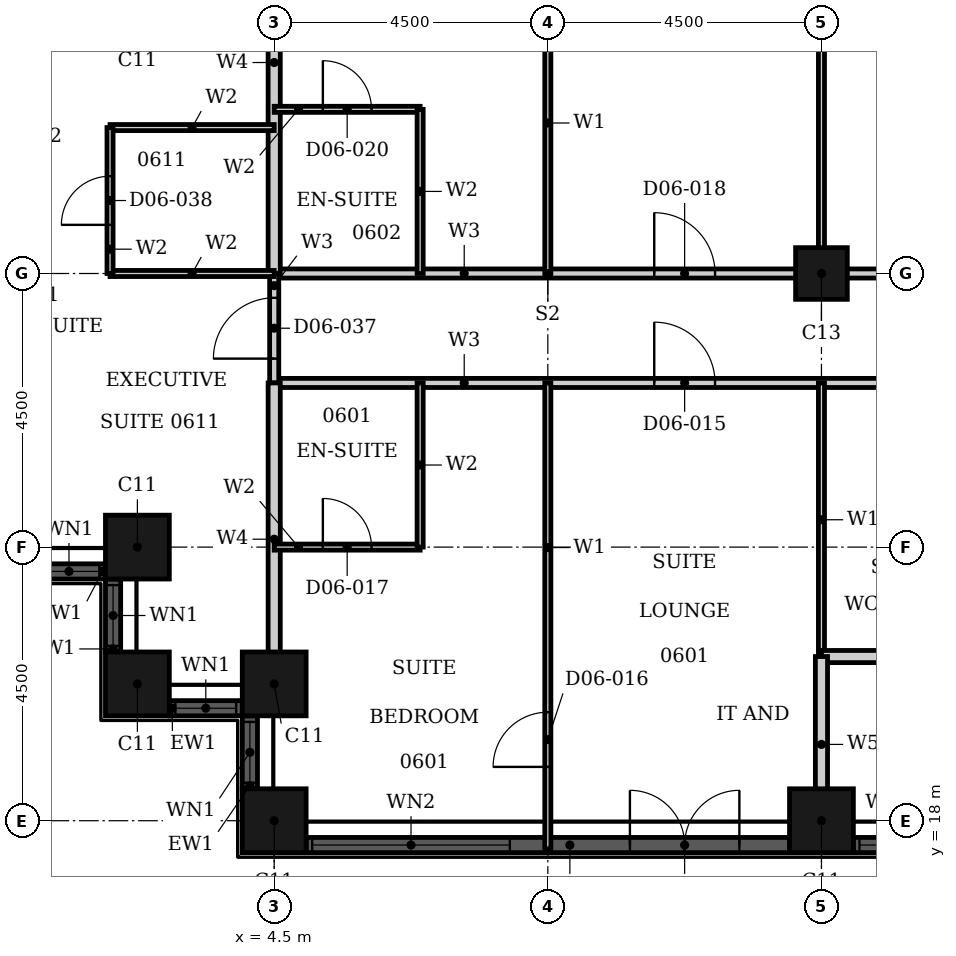
"""IFC4 building model, lengths in metres.
Left out: names, types, materials, properties, quantities, classifications, styles, units other than length and angle.
Written with IfcOpenShell. Run it as: python <this file> out.ifc"""

import sys

from ifc_helpers import new_model, si_unit, direction, frame, frame_2d, origin, origin_2d, place, context, subcontext, project, spatial, rectangle, hollow_rectangle, extrude, element, fill, save


model = new_model("IFC4")
c1 = context("Model", 3, precision=1e-05, world=origin(), true_north=direction((0.0, 1.0)))
c2 = subcontext(c1, "Body", "Model", "MODEL_VIEW")
j1 = project(units=[si_unit("LENGTHUNIT", "METRE"), si_unit("PLANEANGLEUNIT", "RADIAN")], contexts=[c1])
p1 = place(None, origin())
s1 = spatial("IfcSite", under=j1, at=p1, CompositionType="ELEMENT")
p2 = place(p1, origin())
s2 = spatial("IfcBuilding", under=s1, at=p2, CompositionType="ELEMENT")
p3 = place(p2, frame((0.0, 0.0, 33.6)))
s3 = spatial("IfcBuildingStorey", under=s2, at=p3, CompositionType="ELEMENT", Elevation=33.6)
for number, where, z_axis, x_axis in (
    (1, (2.25, 22.5, 0.0), (0.0, 0.0, 1.0), (1.0, 0.0, 0.0)),
    (2, (2.25, 20.25, 0.0), (0.0, 0.0, 1.0), (1.0, 0.0, 0.0)),
    (3, (4.5, 20.25, 0.0), (0.0, 0.0, 1.0), (1.0, 0.0, 0.0)),
    (4, (4.5, 18.0, 0.0), (0.0, 0.0, 1.0), (1.0, 0.0, 0.0)),
    (5, (13.5, 18.0, 0.0), (0.0, 0.0, 1.0), (1.0, 0.0, 0.0)),
):
    element("IfcColumn", number, at=place(p3, frame(where, z_axis=z_axis, x_axis=x_axis)), inside=s3, PredefinedType="COLUMN", context=c2, shape_type="SweptSolid", body=[
        extrude(hollow_rectangle(XDim=1.05, YDim=1.05, WallThickness=0.034, at=origin_2d()), origin(), (0.0, 0.0, 1.0), 3.6),
    ])
p4 = place(p3, frame((13.5, 27.0, 0.0), z_axis=(0.0, 0.0, 1.0), x_axis=(1.0, 0.0, 0.0)))
e6 = element("IfcColumn", 6, at=p4, inside=s3, PredefinedType="COLUMN", context=c2, shape_type="SweptSolid", body=[
    extrude(hollow_rectangle(XDim=0.85, YDim=0.85, WallThickness=0.026, at=origin_2d()), origin(), (0.0, 0.0, 1.0), 3.6),
])
p5 = place(p3, frame((0.525, 22.1, 0.0), z_axis=(0.0, 0.0, 1.0), x_axis=(1.0, 0.0, 0.0)))
e7 = element("IfcWall", 7, at=p5, inside=s3, PredefinedType="SOLIDWALL", context=c2, shape_type="SweptSolid", body=[
    extrude(rectangle(XDim=1.2, YDim=0.25, at=frame_2d((0.6, 0.0))), origin(), (0.0, 0.0, 1.0), 3.6),
])
p6 = place(p5, frame((0.1, 0.0, 0.9)))
e8 = element("IfcOpeningElement", 8, at=p6, cuts=e7, PredefinedType="OPENING", context=c2, shape_type="SweptSolid", body=[
    extrude(rectangle(XDim=1.0, YDim=2.08, at=frame_2d((0.5, 1.04))), frame((0.0, 0.135, 0.0), z_axis=(0.0, -1.0, 0.0), x_axis=(1.0, 0.0, 0.0)), (0.0, 0.0, 1.0), 0.27),
])
p7 = place(p3, frame((1.85, 21.975, 0.0), z_axis=(0.0, 0.0, 1.0), x_axis=(0.0, -1.0, 0.0)))
e9 = element("IfcWall", 9, at=p7, inside=s3, PredefinedType="SOLIDWALL", context=c2, shape_type="SweptSolid", body=[
    extrude(rectangle(XDim=1.2, YDim=0.25, at=frame_2d((0.6, 0.0))), origin(), (0.0, 0.0, 1.0), 3.6),
])
p8 = place(p7, frame((0.1, 0.0, 0.9)))
e10 = element("IfcOpeningElement", 10, at=p8, cuts=e9, PredefinedType="OPENING", context=c2, shape_type="SweptSolid", body=[
    extrude(rectangle(XDim=1.0, YDim=2.08, at=frame_2d((0.5, 1.04))), frame((0.0, 0.135, 0.0), z_axis=(0.0, -1.0, 0.0), x_axis=(1.0, 0.0, 0.0)), (0.0, 0.0, 1.0), 0.27),
])
p9 = place(p3, frame((2.775, 19.85, 0.0), z_axis=(0.0, 0.0, 1.0), x_axis=(1.0, 0.0, 0.0)))
e11 = element("IfcWall", 11, at=p9, inside=s3, PredefinedType="SOLIDWALL", context=c2, shape_type="SweptSolid", body=[
    extrude(rectangle(XDim=1.2, YDim=0.25, at=frame_2d((0.6, 0.0))), origin(), (0.0, 0.0, 1.0), 3.6),
])
p10 = place(p9, frame((0.1, 0.0, 0.9)))
e12 = element("IfcOpeningElement", 12, at=p10, cuts=e11, PredefinedType="OPENING", context=c2, shape_type="SweptSolid", body=[
    extrude(rectangle(XDim=1.0, YDim=2.08, at=frame_2d((0.5, 1.04))), frame((0.0, 0.135, 0.0), z_axis=(0.0, -1.0, 0.0), x_axis=(1.0, 0.0, 0.0)), (0.0, 0.0, 1.0), 0.27),
])
p11 = place(p3, frame((4.1, 19.725, 0.0), z_axis=(0.0, 0.0, 1.0), x_axis=(0.0, -1.0, 0.0)))
e13 = element("IfcWall", 13, at=p11, inside=s3, PredefinedType="SOLIDWALL", context=c2, shape_type="SweptSolid", body=[
    extrude(rectangle(XDim=1.2, YDim=0.25, at=frame_2d((0.6, 0.0))), origin(), (0.0, 0.0, 1.0), 3.6),
])
p12 = place(p11, frame((0.1, 0.0, 0.9)))
e14 = element("IfcOpeningElement", 14, at=p12, cuts=e13, PredefinedType="OPENING", context=c2, shape_type="SweptSolid", body=[
    extrude(rectangle(XDim=1.0, YDim=2.08, at=frame_2d((0.5, 1.04))), frame((0.0, 0.135, 0.0), z_axis=(0.0, -1.0, 0.0), x_axis=(1.0, 0.0, 0.0)), (0.0, 0.0, 1.0), 0.27),
])
p13 = place(p3, frame((5.025, 17.6, 0.0), z_axis=(0.0, 0.0, 1.0), x_axis=(1.0, 0.0, 0.0)))
e15 = element("IfcWall", 15, at=p13, inside=s3, PredefinedType="SOLIDWALL", context=c2, shape_type="SweptSolid", body=[
    extrude(rectangle(XDim=7.95, YDim=0.25, at=frame_2d((3.975, 0.0))), origin(), (0.0, 0.0, 1.0), 3.6),
])
p14 = place(p13, frame((0.1, 0.0, 0.9)))
e16 = element("IfcOpeningElement", 16, at=p14, cuts=e15, PredefinedType="OPENING", context=c2, shape_type="SweptSolid", body=[
    extrude(rectangle(XDim=3.25, YDim=2.08, at=frame_2d((1.625, 1.04))), frame((0.0, 0.135, 0.0), z_axis=(0.0, -1.0, 0.0), x_axis=(1.0, 0.0, 0.0)), (0.0, 0.0, 1.0), 0.27),
])
p15 = place(p13, frame((5.325, 0.0, 0.0)))
e17 = element("IfcOpeningElement", 17, at=p15, cuts=e15, PredefinedType="OPENING", context=c2, shape_type="SweptSolid", body=[
    extrude(rectangle(XDim=1.8, YDim=2.4, at=frame_2d((0.9, 1.2))), frame((0.0, 0.135, 0.0), z_axis=(0.0, -1.0, 0.0), x_axis=(1.0, 0.0, 0.0)), (0.0, 0.0, 1.0), 0.27),
])
p16 = place(p3, frame((14.025, 17.6, 0.0), z_axis=(0.0, 0.0, 1.0), x_axis=(1.0, 0.0, 0.0)))
e18 = element("IfcWall", 18, at=p16, inside=s3, PredefinedType="SOLIDWALL", context=c2, shape_type="SweptSolid", body=[
    extrude(rectangle(XDim=1.2, YDim=0.25, at=frame_2d((0.6, 0.0))), origin(), (0.0, 0.0, 1.0), 3.6),
])
p17 = place(p16, frame((0.1, 0.0, 0.9)))
e19 = element("IfcOpeningElement", 19, at=p17, cuts=e18, PredefinedType="OPENING", context=c2, shape_type="SweptSolid", body=[
    extrude(rectangle(XDim=1.0, YDim=2.08, at=frame_2d((0.5, 1.04))), frame((0.0, 0.135, 0.0), z_axis=(0.0, -1.0, 0.0), x_axis=(1.0, 0.0, 0.0)), (0.0, 0.0, 1.0), 0.27),
])
p18 = place(p3, frame((4.5, 25.2, 0.0), z_axis=(0.0, 0.0, 1.0), x_axis=(1.0, 0.0, 0.0)))
e20 = element("IfcWall", 20, at=p18, inside=s3, PredefinedType="PARTITIONING", context=c2, shape_type="SweptSolid", body=[
    extrude(rectangle(XDim=11.7, YDim=0.15, at=frame_2d((5.85, 0.0))), origin(), (0.0, 0.0, 1.0), 3.3),
])
p19 = place(p18, frame((6.25, 0.0, 0.0)))
e21 = element("IfcOpeningElement", 21, at=p19, cuts=e20, PredefinedType="OPENING", context=c2, shape_type="SweptSolid", body=[
    extrude(rectangle(XDim=1.0, YDim=2.1, at=frame_2d((0.5, 1.05))), frame((0.0, 0.085, 0.0), z_axis=(0.0, -1.0, 0.0), x_axis=(1.0, 0.0, 0.0)), (0.0, 0.0, 1.0), 0.17),
])
p20 = place(p3, frame((4.5, 27.0, 0.0), z_axis=(0.0, 0.0, 1.0), x_axis=(1.0, 0.0, 0.0)))
e22 = element("IfcWall", 22, at=p20, inside=s3, PredefinedType="PARTITIONING", context=c2, shape_type="SweptSolid", body=[
    extrude(rectangle(XDim=11.7, YDim=0.15, at=frame_2d((5.85, 0.0))), origin(), (0.0, 0.0, 1.0), 2.58),
])
p21 = place(p20, frame((6.25, 0.0, 0.0)))
e23 = element("IfcOpeningElement", 23, at=p21, cuts=e22, PredefinedType="OPENING", context=c2, shape_type="SweptSolid", body=[
    extrude(rectangle(XDim=1.0, YDim=2.1, at=frame_2d((0.5, 1.05))), frame((0.0, 0.085, 0.0), z_axis=(0.0, -1.0, 0.0), x_axis=(1.0, 0.0, 0.0)), (0.0, 0.0, 1.0), 0.17),
])
p22 = place(p3, frame((4.5, 25.2, 0.0), z_axis=(0.0, 0.0, 1.0), x_axis=(0.0, 1.0, 0.0)))
e24 = element("IfcWall", 24, at=p22, inside=s3, PredefinedType="PARTITIONING", context=c2, shape_type="SweptSolid", body=[
    extrude(rectangle(XDim=1.8, YDim=0.15, at=frame_2d((0.9, 0.0))), origin(), (0.0, 0.0, 1.0), 3.3),
])
p23 = place(p22, frame((0.4, 0.0, 0.0)))
e25 = element("IfcOpeningElement", 25, at=p23, cuts=e24, PredefinedType="OPENING", context=c2, shape_type="SweptSolid", body=[
    extrude(rectangle(XDim=1.0, YDim=2.1, at=frame_2d((0.5, 1.05))), frame((0.0, 0.085, 0.0), z_axis=(0.0, -1.0, 0.0), x_axis=(1.0, 0.0, 0.0)), (0.0, 0.0, 1.0), 0.17),
])
p24 = place(p3, frame((13.5, 27.0, 0.0), z_axis=(0.0, 0.0, 1.0), x_axis=(0.0, 1.0, 0.0)))
e26 = element("IfcWall", 26, at=p24, inside=s3, PredefinedType="PARTITIONING", context=c2, shape_type="SweptSolid", body=[
    extrude(rectangle(XDim=9.19, YDim=0.1, at=frame_2d((4.595, 0.0))), origin(), (0.0, 0.0, 1.0), 2.38),
])
p25 = place(p3, frame((13.5, 20.7, 0.0), z_axis=(0.0, 0.0, 1.0), x_axis=(0.0, 1.0, 0.0)))
e27 = element("IfcWall", 27, at=p25, inside=s3, PredefinedType="PARTITIONING", context=c2, shape_type="SweptSolid", body=[
    extrude(rectangle(XDim=4.5, YDim=0.1, at=frame_2d((2.25, 0.0))), origin(), (0.0, 0.0, 1.0), 2.38),
])
p26 = place(p3, frame((9.0, 27.0, 0.0), z_axis=(0.0, 0.0, 1.0), x_axis=(0.0, 1.0, 0.0)))
e28 = element("IfcWall", 28, at=p26, inside=s3, PredefinedType="PARTITIONING", context=c2, shape_type="SweptSolid", body=[
    extrude(rectangle(XDim=9.465, YDim=0.1, at=frame_2d((4.732, 0.0))), origin(), (0.0, 0.0, 1.0), 3.3),
])
p27 = place(p26, frame((4.95, 0.0, 0.0)))
e29 = element("IfcOpeningElement", 29, at=p27, cuts=e28, PredefinedType="OPENING", context=c2, shape_type="SweptSolid", body=[
    extrude(rectangle(XDim=0.9, YDim=2.1, at=frame_2d((0.45, 1.05))), frame((0.0, 0.06, 0.0), z_axis=(0.0, -1.0, 0.0), x_axis=(1.0, 0.0, 0.0)), (0.0, 0.0, 1.0), 0.12),
])
p28 = place(p3, frame((9.0, 17.535, 0.0), z_axis=(0.0, 0.0, 1.0), x_axis=(0.0, 1.0, 0.0)))
e30 = element("IfcWall", 30, at=p28, inside=s3, PredefinedType="PARTITIONING", context=c2, shape_type="SweptSolid", body=[
    extrude(rectangle(XDim=7.665, YDim=0.1, at=frame_2d((3.833, 0.0))), origin(), (0.0, 0.0, 1.0), 3.3),
])
p29 = place(p28, frame((1.35, 0.0, 0.0)))
e31 = element("IfcOpeningElement", 31, at=p29, cuts=e30, PredefinedType="OPENING", context=c2, shape_type="SweptSolid", body=[
    extrude(rectangle(XDim=0.9, YDim=2.1, at=frame_2d((0.45, 1.05))), frame((0.0, 0.06, 0.0), z_axis=(0.0, -1.0, 0.0), x_axis=(1.0, 0.0, 0.0)), (0.0, 0.0, 1.0), 0.12),
])
p30 = place(p3, frame((4.5, 27.0, 0.0), z_axis=(0.0, 0.0, 1.0), x_axis=(0.0, 1.0, 0.0)))
e32 = element("IfcWall", 32, at=p30, inside=s3, PredefinedType="PARTITIONING", context=c2, shape_type="SweptSolid", body=[
    extrude(rectangle(XDim=6.94, YDim=0.2, at=frame_2d((3.47, 0.0))), origin(), (0.0, 0.0, 1.0), 3.3),
])
p31 = place(p3, frame((4.5, 20.06, 0.0), z_axis=(0.0, 0.0, 1.0), x_axis=(0.0, 1.0, 0.0)))
e33 = element("IfcWall", 33, at=p31, inside=s3, PredefinedType="PARTITIONING", context=c2, shape_type="SweptSolid", body=[
    extrude(rectangle(XDim=5.14, YDim=0.2, at=frame_2d((2.57, 0.0))), origin(), (0.0, 0.0, 1.0), 3.3),
])
p32 = place(p3, frame((4.5, 22.5, 0.0), z_axis=(0.0, 0.0, 1.0), x_axis=(1.0, 0.0, 0.0)))
e34 = element("IfcWall", 34, at=p32, inside=s3, PredefinedType="PARTITIONING", context=c2, shape_type="SweptSolid", body=[
    extrude(rectangle(XDim=2.4, YDim=0.1, at=frame_2d((1.2, 0.0))), origin(), (0.0, 0.0, 1.0), 2.58),
])
p33 = place(p32, frame((0.8, 0.0, 0.0)))
e35 = element("IfcOpeningElement", 35, at=p33, cuts=e34, PredefinedType="OPENING", context=c2, shape_type="SweptSolid", body=[
    extrude(rectangle(XDim=0.8, YDim=2.1, at=frame_2d((0.4, 1.05))), frame((0.0, 0.06, 0.0), z_axis=(0.0, -1.0, 0.0), x_axis=(1.0, 0.0, 0.0)), (0.0, 0.0, 1.0), 0.12),
])
p34 = place(p3, frame((1.8, 27.0, 0.0), z_axis=(0.0, 0.0, 1.0), x_axis=(1.0, 0.0, 0.0)))
e36 = element("IfcWall", 36, at=p34, inside=s3, PredefinedType="PARTITIONING", context=c2, shape_type="SweptSolid", body=[
    extrude(rectangle(XDim=2.7, YDim=0.1, at=frame_2d((1.35, 0.0))), origin(), (0.0, 0.0, 1.0), 2.58),
])
p35 = place(p3, frame((1.8, 29.4, 0.0), z_axis=(0.0, 0.0, 1.0), x_axis=(1.0, 0.0, 0.0)))
e37 = element("IfcWall", 37, at=p35, inside=s3, PredefinedType="PARTITIONING", context=c2, shape_type="SweptSolid", body=[
    extrude(rectangle(XDim=2.7, YDim=0.1, at=frame_2d((1.35, 0.0))), origin(), (0.0, 0.0, 1.0), 3.3),
])
p36 = place(p3, frame((4.5, 29.7, 0.0), z_axis=(0.0, 0.0, 1.0), x_axis=(1.0, 0.0, 0.0)))
e38 = element("IfcWall", 38, at=p36, inside=s3, PredefinedType="PARTITIONING", context=c2, shape_type="SweptSolid", body=[
    extrude(rectangle(XDim=2.4, YDim=0.1, at=frame_2d((1.2, 0.0))), origin(), (0.0, 0.0, 1.0), 3.3),
])
p37 = place(p36, frame((0.8, 0.0, 0.0)))
e39 = element("IfcOpeningElement", 39, at=p37, cuts=e38, PredefinedType="OPENING", context=c2, shape_type="SweptSolid", body=[
    extrude(rectangle(XDim=0.8, YDim=2.1, at=frame_2d((0.4, 1.05))), frame((0.0, 0.06, 0.0), z_axis=(0.0, -1.0, 0.0), x_axis=(1.0, 0.0, 0.0)), (0.0, 0.0, 1.0), 0.12),
])
p38 = place(p3, frame((1.8, 27.0, 0.0), z_axis=(0.0, 0.0, 1.0), x_axis=(0.0, 1.0, 0.0)))
e40 = element("IfcWall", 40, at=p38, inside=s3, PredefinedType="PARTITIONING", context=c2, shape_type="SweptSolid", body=[
    extrude(rectangle(XDim=2.4, YDim=0.1, at=frame_2d((1.2, 0.0))), origin(), (0.0, 0.0, 1.0), 3.3),
])
p39 = place(p38, frame((0.8, 0.0, 0.0)))
e41 = element("IfcOpeningElement", 41, at=p39, cuts=e40, PredefinedType="OPENING", context=c2, shape_type="SweptSolid", body=[
    extrude(rectangle(XDim=0.8, YDim=2.1, at=frame_2d((0.4, 1.05))), frame((0.0, 0.06, 0.0), z_axis=(0.0, -1.0, 0.0), x_axis=(1.0, 0.0, 0.0)), (0.0, 0.0, 1.0), 0.12),
])
for number, where, z_axis, x_axis in (
    (42, (6.9, 27.0, 0.0), (0.0, 0.0, 1.0), (0.0, 1.0, 0.0)),
    (43, (6.9, 22.5, 0.0), (0.0, 0.0, 1.0), (0.0, 1.0, 0.0)),
):
    element("IfcWall", number, at=place(p3, frame(where, z_axis=z_axis, x_axis=x_axis)), inside=s3, PredefinedType="PARTITIONING", context=c2, shape_type="SweptSolid", body=[
        extrude(rectangle(XDim=2.7, YDim=0.1, at=frame_2d((1.35, 0.0))), origin(), (0.0, 0.0, 1.0), 3.3),
    ])
p40 = place(p3, frame((13.5, 20.7, 0.0), z_axis=(0.0, 0.0, 1.0), x_axis=(1.0, 0.0, 0.0)))
e44 = element("IfcWall", 44, at=p40, inside=s3, PredefinedType="PARTITIONING", context=c2, shape_type="SweptSolid", body=[
    extrude(rectangle(XDim=4.5, YDim=0.2, at=frame_2d((2.25, 0.0))), origin(), (0.0, 0.0, 1.0), 3.3),
])
p41 = place(p40, frame((3.15, 0.0, 0.0)))
e45 = element("IfcOpeningElement", 45, at=p41, cuts=e44, PredefinedType="OPENING", context=c2, shape_type="SweptSolid", body=[
    extrude(rectangle(XDim=0.9, YDim=2.1, at=frame_2d((0.45, 1.05))), frame((0.0, 0.11, 0.0), z_axis=(0.0, -1.0, 0.0), x_axis=(1.0, 0.0, 0.0)), (0.0, 0.0, 1.0), 0.22),
])
p42 = place(p3, frame((13.5, 17.81, 0.0), z_axis=(0.0, 0.0, 1.0), x_axis=(0.0, 1.0, 0.0)))
e46 = element("IfcWall", 46, at=p42, inside=s3, PredefinedType="PARTITIONING", context=c2, shape_type="SweptSolid", body=[
    extrude(rectangle(XDim=2.89, YDim=0.2, at=frame_2d((1.445, 0.0))), origin(), (0.0, 0.0, 1.0), 2.38),
])
p43 = place(p6, origin())
e47 = element("IfcWindow", 47, at=p43, inside=s3, PartitioningType="SINGLE_PANEL", PredefinedType="WINDOW", context=c2, shape_type="SweptSolid", body=[
    extrude(rectangle(XDim=1.0, YDim=2.08, at=frame_2d((0.5, 1.04))), frame((0.0, 0.03, 0.0), z_axis=(0.0, -1.0, 0.0), x_axis=(1.0, 0.0, 0.0)), (0.0, 0.0, 1.0), 0.06),
])
fill(e8, e47)
p44 = place(p8, origin())
e48 = element("IfcWindow", 48, at=p44, inside=s3, PartitioningType="SINGLE_PANEL", PredefinedType="WINDOW", context=c2, shape_type="SweptSolid", body=[
    extrude(rectangle(XDim=1.0, YDim=2.08, at=frame_2d((0.5, 1.04))), frame((0.0, 0.03, 0.0), z_axis=(0.0, -1.0, 0.0), x_axis=(1.0, 0.0, 0.0)), (0.0, 0.0, 1.0), 0.06),
])
fill(e10, e48)
p45 = place(p10, origin())
e49 = element("IfcWindow", 49, at=p45, inside=s3, PartitioningType="SINGLE_PANEL", PredefinedType="WINDOW", context=c2, shape_type="SweptSolid", body=[
    extrude(rectangle(XDim=1.0, YDim=2.08, at=frame_2d((0.5, 1.04))), frame((0.0, 0.03, 0.0), z_axis=(0.0, -1.0, 0.0), x_axis=(1.0, 0.0, 0.0)), (0.0, 0.0, 1.0), 0.06),
])
fill(e12, e49)
p46 = place(p12, origin())
e50 = element("IfcWindow", 50, at=p46, inside=s3, PartitioningType="SINGLE_PANEL", PredefinedType="WINDOW", context=c2, shape_type="SweptSolid", body=[
    extrude(rectangle(XDim=1.0, YDim=2.08, at=frame_2d((0.5, 1.04))), frame((0.0, 0.03, 0.0), z_axis=(0.0, -1.0, 0.0), x_axis=(1.0, 0.0, 0.0)), (0.0, 0.0, 1.0), 0.06),
])
fill(e14, e50)
p47 = place(p14, origin())
e51 = element("IfcWindow", 51, at=p47, inside=s3, PartitioningType="SINGLE_PANEL", PredefinedType="WINDOW", context=c2, shape_type="SweptSolid", body=[
    extrude(rectangle(XDim=3.25, YDim=2.08, at=frame_2d((1.625, 1.04))), frame((0.0, 0.03, 0.0), z_axis=(0.0, -1.0, 0.0), x_axis=(1.0, 0.0, 0.0)), (0.0, 0.0, 1.0), 0.06),
])
fill(e16, e51)
p48 = place(p15, origin())
e52 = element("IfcDoor", 52, at=p48, inside=s3, OperationType="DOUBLE_DOOR_SINGLE_SWING", PredefinedType="DOOR", context=c2, shape_type="SweptSolid", body=[
    extrude(rectangle(XDim=1.8, YDim=2.4, at=frame_2d((0.9, 1.2))), frame((0.0, 0.025, 0.0), z_axis=(0.0, -1.0, 0.0), x_axis=(1.0, 0.0, 0.0)), (0.0, 0.0, 1.0), 0.05),
])
fill(e17, e52)
p49 = place(p17, origin())
e53 = element("IfcWindow", 53, at=p49, inside=s3, PartitioningType="SINGLE_PANEL", PredefinedType="WINDOW", context=c2, shape_type="SweptSolid", body=[
    extrude(rectangle(XDim=1.0, YDim=2.08, at=frame_2d((0.5, 1.04))), frame((0.0, 0.03, 0.0), z_axis=(0.0, -1.0, 0.0), x_axis=(1.0, 0.0, 0.0)), (0.0, 0.0, 1.0), 0.06),
])
fill(e19, e53)
p50 = place(p19, origin())
e54 = element("IfcDoor", 54, at=p50, inside=s3, OperationType="SINGLE_SWING_RIGHT", PredefinedType="DOOR", context=c2, shape_type="SweptSolid", body=[
    extrude(rectangle(XDim=1.0, YDim=2.1, at=frame_2d((0.5, 1.05))), frame((0.0, 0.025, 0.0), z_axis=(0.0, -1.0, 0.0), x_axis=(1.0, 0.0, 0.0)), (0.0, 0.0, 1.0), 0.05),
])
fill(e21, e54)
p51 = place(p29, origin())
e55 = element("IfcDoor", 55, at=p51, inside=s3, OperationType="SINGLE_SWING_LEFT", PredefinedType="DOOR", context=c2, shape_type="SweptSolid", body=[
    extrude(rectangle(XDim=0.9, YDim=2.1, at=frame_2d((0.45, 1.05))), frame((0.0, 0.025, 0.0), z_axis=(0.0, -1.0, 0.0), x_axis=(1.0, 0.0, 0.0)), (0.0, 0.0, 1.0), 0.05),
])
fill(e31, e55)
p52 = place(p33, origin())
e56 = element("IfcDoor", 56, at=p52, inside=s3, OperationType="SINGLE_SWING_RIGHT", PredefinedType="DOOR", context=c2, shape_type="SweptSolid", body=[
    extrude(rectangle(XDim=0.8, YDim=2.1, at=frame_2d((0.4, 1.05))), frame((0.0, 0.025, 0.0), z_axis=(0.0, -1.0, 0.0), x_axis=(1.0, 0.0, 0.0)), (0.0, 0.0, 1.0), 0.05),
])
fill(e35, e56)
p53 = place(p21, origin())
e57 = element("IfcDoor", 57, at=p53, inside=s3, OperationType="SINGLE_SWING_LEFT", PredefinedType="DOOR", context=c2, shape_type="SweptSolid", body=[
    extrude(rectangle(XDim=1.0, YDim=2.1, at=frame_2d((0.5, 1.05))), frame((0.0, 0.025, 0.0), z_axis=(0.0, -1.0, 0.0), x_axis=(1.0, 0.0, 0.0)), (0.0, 0.0, 1.0), 0.05),
])
fill(e23, e57)
p54 = place(p37, origin())
e58 = element("IfcDoor", 58, at=p54, inside=s3, OperationType="SINGLE_SWING_LEFT", PredefinedType="DOOR", context=c2, shape_type="SweptSolid", body=[
    extrude(rectangle(XDim=0.8, YDim=2.1, at=frame_2d((0.4, 1.05))), frame((0.0, 0.025, 0.0), z_axis=(0.0, -1.0, 0.0), x_axis=(1.0, 0.0, 0.0)), (0.0, 0.0, 1.0), 0.05),
])
fill(e39, e58)
p55 = place(p23, origin())
e59 = element("IfcDoor", 59, at=p55, inside=s3, OperationType="SINGLE_SWING_LEFT", PredefinedType="DOOR", context=c2, shape_type="SweptSolid", body=[
    extrude(rectangle(XDim=1.0, YDim=2.1, at=frame_2d((0.5, 1.05))), frame((0.0, 0.025, 0.0), z_axis=(0.0, -1.0, 0.0), x_axis=(1.0, 0.0, 0.0)), (0.0, 0.0, 1.0), 0.05),
])
fill(e25, e59)
p56 = place(p39, origin())
e60 = element("IfcDoor", 60, at=p56, inside=s3, OperationType="SINGLE_SWING_LEFT", PredefinedType="DOOR", context=c2, shape_type="SweptSolid", body=[
    extrude(rectangle(XDim=0.8, YDim=2.1, at=frame_2d((0.4, 1.05))), frame((0.0, 0.025, 0.0), z_axis=(0.0, -1.0, 0.0), x_axis=(1.0, 0.0, 0.0)), (0.0, 0.0, 1.0), 0.05),
])
fill(e41, e60)
save(model, sys.argv[1])
